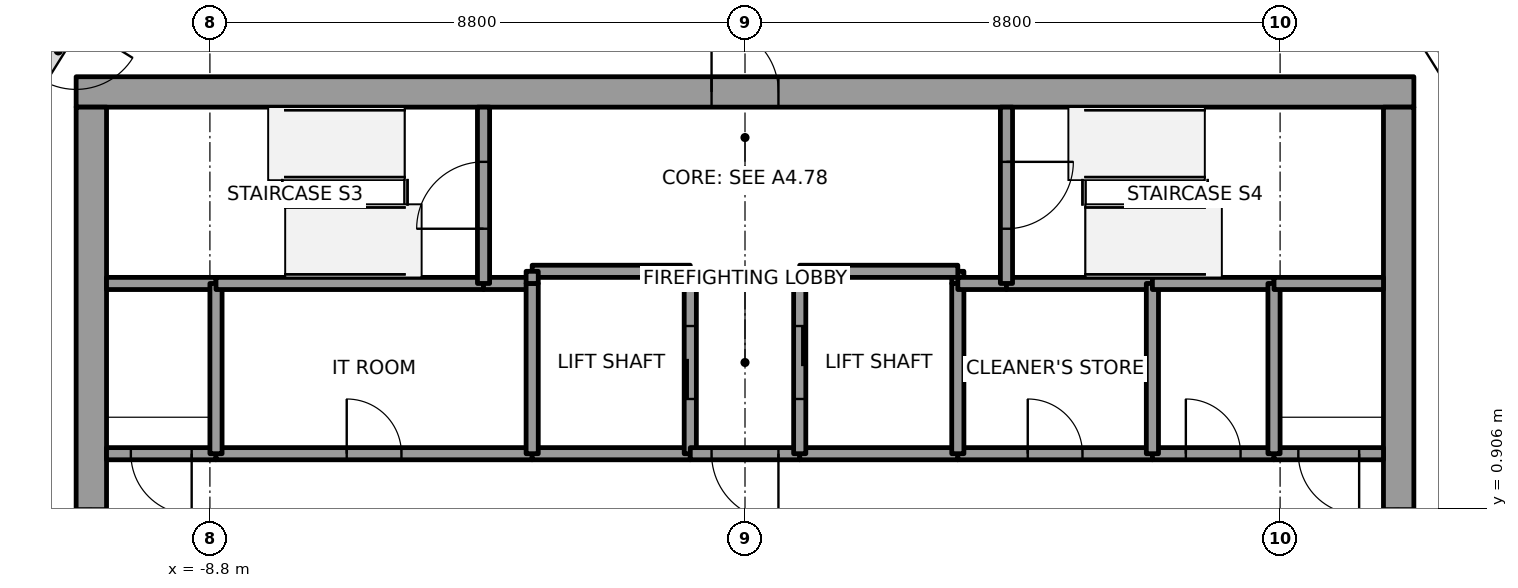
"""IFC4 building model, lengths in metres.
Left out: names, types, materials, properties, quantities, classifications, styles, units other than length and angle.
Written with IfcOpenShell. Run it as: python <this file> out.ifc"""

import sys

from ifc_helpers import new_model, si_unit, direction, frame, frame_2d, origin, place, context, subcontext, project, spatial, rectangle, extrude, element, fill, save


model = new_model("IFC4")
c1 = context("Model", 3, precision=1e-05, world=origin(), true_north=direction((0.0, 1.0)))
c2 = subcontext(c1, "Body", "Model", "MODEL_VIEW")
j1 = project(units=[si_unit("LENGTHUNIT", "METRE"), si_unit("PLANEANGLEUNIT", "RADIAN")], contexts=[c1])
p1 = place(None, origin())
s1 = spatial("IfcSite", under=j1, at=p1, CompositionType="ELEMENT")
p2 = place(p1, origin())
s2 = spatial("IfcBuilding", under=s1, at=p2, CompositionType="ELEMENT")
p3 = place(p2, frame((0.0, 0.0, 339.4)))
s3 = spatial("IfcBuildingStorey", under=s2, at=p3, CompositionType="ELEMENT", Elevation=339.4)
p4 = place(p3, frame((-11.0, 7.75, 0.0), z_axis=(0.0, 0.0, 1.0), x_axis=(1.0, 0.0, 0.0)))
e1 = element("IfcWall", 1, at=p4, inside=s3, PredefinedType="SHEAR", context=c2, shape_type="SweptSolid", body=[
    extrude(rectangle(XDim=22.0, YDim=0.5, at=frame_2d((11.0, 0.0))), origin(), (0.0, 0.0, 1.0), 5.4),
])
p5 = place(p4, frame((10.45, 0.0, 0.0)))
e2 = element("IfcOpeningElement", 2, at=p5, cuts=e1, PredefinedType="OPENING", context=c2, shape_type="SweptSolid", body=[
    extrude(rectangle(XDim=1.1, YDim=2.1, at=frame_2d((0.55, 1.05))), frame((0.0, 0.25, 0.0), z_axis=(0.0, -1.0, 0.0), x_axis=(1.0, 0.0, 0.0)), (0.0, 0.0, 1.0), 0.5),
])
p6 = place(p3, frame((-10.75, -7.5, 0.0), z_axis=(0.0, 0.0, 1.0), x_axis=(0.0, 1.0, 0.0)))
e3 = element("IfcWall", 3, at=p6, inside=s3, PredefinedType="SHEAR", context=c2, shape_type="SweptSolid", body=[
    extrude(rectangle(XDim=15.0, YDim=0.5, at=frame_2d((7.5, 0.0))), origin(), (0.0, 0.0, 1.0), 5.4),
])
p7 = place(p6, frame((6.6, 0.0, 0.0)))
e4 = element("IfcOpeningElement", 4, at=p7, cuts=e3, PredefinedType="OPENING", context=c2, shape_type="SweptSolid", body=[
    extrude(rectangle(XDim=1.8, YDim=2.1, at=frame_2d((0.9, 1.05))), frame((0.0, 0.25, 0.0), z_axis=(0.0, -1.0, 0.0), x_axis=(1.0, 0.0, 0.0)), (0.0, 0.0, 1.0), 0.5),
])
p8 = place(p3, frame((10.75, -7.5, 0.0), z_axis=(0.0, 0.0, 1.0), x_axis=(0.0, 1.0, 0.0)))
e5 = element("IfcWall", 5, at=p8, inside=s3, PredefinedType="SHEAR", context=c2, shape_type="SweptSolid", body=[
    extrude(rectangle(XDim=15.0, YDim=0.5, at=frame_2d((7.5, 0.0))), origin(), (0.0, 0.0, 1.0), 5.4),
])
p9 = place(p8, frame((6.6, 0.0, 0.0)))
e6 = element("IfcOpeningElement", 6, at=p9, cuts=e5, PredefinedType="OPENING", context=c2, shape_type="SweptSolid", body=[
    extrude(rectangle(XDim=1.8, YDim=2.1, at=frame_2d((0.9, 1.05))), frame((0.0, 0.25, 0.0), z_axis=(0.0, -1.0, 0.0), x_axis=(1.0, 0.0, 0.0)), (0.0, 0.0, 1.0), 0.5),
])
p10 = place(p3, frame((-10.372, 9.901, 0.0), z_axis=(0.0, 0.0, 1.0), x_axis=(-0.52965846741, -0.84821100435, 0.0)))
e7 = element("IfcWall", 7, at=p10, inside=s3, PredefinedType="SOLIDWALL", context=c2, shape_type="SweptSolid", body=[
    extrude(rectangle(XDim=3.481, YDim=0.2, at=frame_2d((1.74, 0.0))), origin(), (0.0, 0.0, 1.0), 4.533),
])
p11 = place(p10, frame((1.19, 0.0, 0.0)))
e8 = element("IfcOpeningElement", 8, at=p11, cuts=e7, PredefinedType="OPENING", context=c2, shape_type="SweptSolid", body=[
    extrude(rectangle(XDim=1.1, YDim=2.1, at=frame_2d((0.55, 1.05))), frame((0.0, 0.1, 0.0), z_axis=(0.0, -1.0, 0.0), x_axis=(1.0, 0.0, 0.0)), (0.0, 0.0, 1.0), 0.2),
])
p12 = place(p3, frame((-8.7, 1.8, 0.0), z_axis=(0.0, 0.0, 1.0), x_axis=(-1.0, 0.0, 0.0)))
e9 = element("IfcWall", 9, at=p12, inside=s3, PredefinedType="SOLIDWALL", context=c2, shape_type="SweptSolid", body=[
    extrude(rectangle(XDim=1.8, YDim=0.2, at=frame_2d((0.9, 0.0))), origin(), (0.0, 0.0, 1.0), 5.25),
])
p13 = place(p12, frame((0.4, 0.0, 0.0)))
e10 = element("IfcOpeningElement", 10, at=p13, cuts=e9, PredefinedType="OPENING", context=c2, shape_type="SweptSolid", body=[
    extrude(rectangle(XDim=1.0, YDim=2.1, at=frame_2d((0.5, 1.05))), frame((0.0, 0.1, 0.0), z_axis=(0.0, -1.0, 0.0), x_axis=(1.0, 0.0, 0.0)), (0.0, 0.0, 1.0), 0.2),
])
p14 = place(p3, frame((-8.7, 4.6, 0.0), z_axis=(0.0, 0.0, 1.0), x_axis=(-1.0, 0.0, 0.0)))
e11 = element("IfcWall", 11, at=p14, inside=s3, PredefinedType="SOLIDWALL", context=c2, shape_type="SweptSolid", body=[
    extrude(rectangle(XDim=1.8, YDim=0.2, at=frame_2d((0.9, 0.0))), origin(), (0.0, 0.0, 1.0), 5.25),
])
p15 = place(p3, frame((-8.7, 1.8, 0.0), z_axis=(0.0, 0.0, 1.0), x_axis=(1.0, 0.0, 0.0)))
e12 = element("IfcWall", 12, at=p15, inside=s3, PredefinedType="SOLIDWALL", context=c2, shape_type="SweptSolid", body=[
    extrude(rectangle(XDim=5.2, YDim=0.2, at=frame_2d((2.6, 0.0))), origin(), (0.0, 0.0, 1.0), 5.25),
])
p16 = place(p15, frame((2.15, 0.0, 0.0)))
e13 = element("IfcOpeningElement", 13, at=p16, cuts=e12, PredefinedType="OPENING", context=c2, shape_type="SweptSolid", body=[
    extrude(rectangle(XDim=0.9, YDim=2.1, at=frame_2d((0.45, 1.05))), frame((0.0, 0.1, 0.0), z_axis=(0.0, -1.0, 0.0), x_axis=(1.0, 0.0, 0.0)), (0.0, 0.0, 1.0), 0.2),
])
p17 = place(p3, frame((-8.7, 4.6, 0.0), z_axis=(0.0, 0.0, 1.0), x_axis=(0.0, -1.0, 0.0)))
e14 = element("IfcWall", 14, at=p17, inside=s3, PredefinedType="SOLIDWALL", context=c2, shape_type="SweptSolid", body=[
    extrude(rectangle(XDim=2.8, YDim=0.2, at=frame_2d((1.4, 0.0))), origin(), (0.0, 0.0, 1.0), 5.25),
])
p18 = place(p3, frame((-4.3, 4.6, 0.0), z_axis=(0.0, 0.0, 1.0), x_axis=(-1.0, 0.0, 0.0)))
e15 = element("IfcWall", 15, at=p18, inside=s3, PredefinedType="SOLIDWALL", context=c2, shape_type="SweptSolid", body=[
    extrude(rectangle(XDim=4.4, YDim=0.2, at=frame_2d((2.2, 0.0))), origin(), (0.0, 0.0, 1.0), 5.25),
])
p19 = place(p3, frame((-3.5, 4.6, 0.0), z_axis=(0.0, 0.0, 1.0), x_axis=(-1.0, 0.0, 0.0)))
e16 = element("IfcWall", 16, at=p19, inside=s3, PredefinedType="SOLIDWALL", context=c2, shape_type="SweptSolid", body=[
    extrude(rectangle(XDim=0.8, YDim=0.2, at=frame_2d((0.4, 0.0))), origin(), (0.0, 0.0, 1.0), 5.25),
])
p20 = place(p3, frame((-4.3, 4.6, 0.0), z_axis=(0.0, 0.0, 1.0), x_axis=(0.0, 1.0, 0.0)))
e17 = element("IfcWall", 17, at=p20, inside=s3, PredefinedType="SOLIDWALL", context=c2, shape_type="SweptSolid", body=[
    extrude(rectangle(XDim=2.9, YDim=0.2, at=frame_2d((1.45, 0.0))), origin(), (0.0, 0.0, 1.0), 5.25),
])
p21 = place(p20, frame((0.9, 0.0, 0.0)))
e18 = element("IfcOpeningElement", 18, at=p21, cuts=e17, PredefinedType="OPENING", context=c2, shape_type="SweptSolid", body=[
    extrude(rectangle(XDim=1.1, YDim=2.1, at=frame_2d((0.55, 1.05))), frame((0.0, 0.1, 0.0), z_axis=(0.0, -1.0, 0.0), x_axis=(1.0, 0.0, 0.0)), (0.0, 0.0, 1.0), 0.2),
])
p22 = place(p3, frame((-0.9, 1.8, 0.0), z_axis=(0.0, 0.0, 1.0), x_axis=(-1.0, 0.0, 0.0)))
e19 = element("IfcWall", 19, at=p22, inside=s3, PredefinedType="SOLIDWALL", context=c2, shape_type="SweptSolid", body=[
    extrude(rectangle(XDim=2.6, YDim=0.2, at=frame_2d((1.3, 0.0))), origin(), (0.0, 0.0, 1.0), 5.25),
])
p23 = place(p3, frame((-3.5, 1.8, 0.0), z_axis=(0.0, 0.0, 1.0), x_axis=(0.0, 1.0, 0.0)))
e20 = element("IfcWall", 20, at=p23, inside=s3, PredefinedType="SOLIDWALL", context=c2, shape_type="SweptSolid", body=[
    extrude(rectangle(XDim=2.8, YDim=0.2, at=frame_2d((1.4, 0.0))), origin(), (0.0, 0.0, 1.0), 5.25),
])
p24 = place(p3, frame((-0.9, 1.8, 0.0), z_axis=(0.0, 0.0, 1.0), x_axis=(0.0, 1.0, 0.0)))
e21 = element("IfcWall", 21, at=p24, inside=s3, PredefinedType="SOLIDWALL", context=c2, shape_type="SweptSolid", body=[
    extrude(rectangle(XDim=3.0, YDim=0.2, at=frame_2d((1.5, 0.0))), origin(), (0.0, 0.0, 1.0), 5.25),
])
p25 = place(p24, frame((0.9, 0.0, 0.0)))
e22 = element("IfcOpeningElement", 22, at=p25, cuts=e21, PredefinedType="OPENING", context=c2, shape_type="SweptSolid", body=[
    extrude(rectangle(XDim=1.2, YDim=2.1, at=frame_2d((0.6, 1.05))), frame((0.0, 0.1, 0.0), z_axis=(0.0, -1.0, 0.0), x_axis=(1.0, 0.0, 0.0)), (0.0, 0.0, 1.0), 0.2),
])
p26 = place(p3, frame((-0.9, 4.8, 0.0), z_axis=(0.0, 0.0, 1.0), x_axis=(-1.0, 0.0, 0.0)))
e23 = element("IfcWall", 23, at=p26, inside=s3, PredefinedType="SOLIDWALL", context=c2, shape_type="SweptSolid", body=[
    extrude(rectangle(XDim=2.6, YDim=0.2, at=frame_2d((1.3, 0.0))), origin(), (0.0, 0.0, 1.0), 5.25),
])
p27 = place(p3, frame((-3.5, 4.8, 0.0), z_axis=(0.0, 0.0, 1.0), x_axis=(0.0, -1.0, 0.0)))
e24 = element("IfcWall", 24, at=p27, inside=s3, PredefinedType="SOLIDWALL", context=c2, shape_type="SweptSolid", body=[
    extrude(rectangle(XDim=0.2, YDim=0.2, at=frame_2d((0.1, 0.0))), origin(), (0.0, 0.0, 1.0), 5.25),
])
p28 = place(p3, frame((0.9, 1.8, 0.0), z_axis=(0.0, 0.0, 1.0), x_axis=(-1.0, 0.0, 0.0)))
e25 = element("IfcWall", 25, at=p28, inside=s3, PredefinedType="SOLIDWALL", context=c2, shape_type="SweptSolid", body=[
    extrude(rectangle(XDim=1.8, YDim=0.2, at=frame_2d((0.9, 0.0))), origin(), (0.0, 0.0, 1.0), 5.25),
])
p29 = place(p28, frame((0.35, 0.0, 0.0)))
e26 = element("IfcOpeningElement", 26, at=p29, cuts=e25, PredefinedType="OPENING", context=c2, shape_type="SweptSolid", body=[
    extrude(rectangle(XDim=1.1, YDim=2.1, at=frame_2d((0.55, 1.05))), frame((0.0, 0.1, 0.0), z_axis=(0.0, -1.0, 0.0), x_axis=(1.0, 0.0, 0.0)), (0.0, 0.0, 1.0), 0.2),
])
p30 = place(p3, frame((3.5, 1.8, 0.0), z_axis=(0.0, 0.0, 1.0), x_axis=(-1.0, 0.0, 0.0)))
e27 = element("IfcWall", 27, at=p30, inside=s3, PredefinedType="SOLIDWALL", context=c2, shape_type="SweptSolid", body=[
    extrude(rectangle(XDim=2.6, YDim=0.2, at=frame_2d((1.3, 0.0))), origin(), (0.0, 0.0, 1.0), 5.25),
])
p31 = place(p3, frame((3.5, 4.6, 0.0), z_axis=(0.0, 0.0, 1.0), x_axis=(0.0, 1.0, 0.0)))
e28 = element("IfcWall", 28, at=p31, inside=s3, PredefinedType="SOLIDWALL", context=c2, shape_type="SweptSolid", body=[
    extrude(rectangle(XDim=0.2, YDim=0.2, at=frame_2d((0.1, 0.0))), origin(), (0.0, 0.0, 1.0), 5.25),
])
p32 = place(p3, frame((3.5, 4.8, 0.0), z_axis=(0.0, 0.0, 1.0), x_axis=(-1.0, 0.0, 0.0)))
e29 = element("IfcWall", 29, at=p32, inside=s3, PredefinedType="SOLIDWALL", context=c2, shape_type="SweptSolid", body=[
    extrude(rectangle(XDim=2.6, YDim=0.2, at=frame_2d((1.3, 0.0))), origin(), (0.0, 0.0, 1.0), 5.25),
])
p33 = place(p3, frame((0.9, 4.8, 0.0), z_axis=(0.0, 0.0, 1.0), x_axis=(0.0, -1.0, 0.0)))
e30 = element("IfcWall", 30, at=p33, inside=s3, PredefinedType="SOLIDWALL", context=c2, shape_type="SweptSolid", body=[
    extrude(rectangle(XDim=3.0, YDim=0.2, at=frame_2d((1.5, 0.0))), origin(), (0.0, 0.0, 1.0), 5.25),
])
p34 = place(p33, frame((0.9, 0.0, 0.0)))
e31 = element("IfcOpeningElement", 31, at=p34, cuts=e30, PredefinedType="OPENING", context=c2, shape_type="SweptSolid", body=[
    extrude(rectangle(XDim=1.2, YDim=2.1, at=frame_2d((0.6, 1.05))), frame((0.0, 0.1, 0.0), z_axis=(0.0, -1.0, 0.0), x_axis=(1.0, 0.0, 0.0)), (0.0, 0.0, 1.0), 0.2),
])
p35 = place(p3, frame((3.5, 1.8, 0.0), z_axis=(0.0, 0.0, 1.0), x_axis=(1.0, 0.0, 0.0)))
e32 = element("IfcWall", 32, at=p35, inside=s3, PredefinedType="SOLIDWALL", context=c2, shape_type="SweptSolid", body=[
    extrude(rectangle(XDim=3.2, YDim=0.2, at=frame_2d((1.6, 0.0))), origin(), (0.0, 0.0, 1.0), 5.25),
])
p36 = place(p35, frame((1.15, 0.0, 0.0)))
e33 = element("IfcOpeningElement", 33, at=p36, cuts=e32, PredefinedType="OPENING", context=c2, shape_type="SweptSolid", body=[
    extrude(rectangle(XDim=0.9, YDim=2.1, at=frame_2d((0.45, 1.05))), frame((0.0, 0.1, 0.0), z_axis=(0.0, -1.0, 0.0), x_axis=(1.0, 0.0, 0.0)), (0.0, 0.0, 1.0), 0.2),
])
p37 = place(p3, frame((3.5, 4.6, 0.0), z_axis=(0.0, 0.0, 1.0), x_axis=(0.0, -1.0, 0.0)))
e34 = element("IfcWall", 34, at=p37, inside=s3, PredefinedType="SOLIDWALL", context=c2, shape_type="SweptSolid", body=[
    extrude(rectangle(XDim=2.8, YDim=0.2, at=frame_2d((1.4, 0.0))), origin(), (0.0, 0.0, 1.0), 5.25),
])
p38 = place(p3, frame((4.3, 4.6, 0.0), z_axis=(0.0, 0.0, 1.0), x_axis=(-1.0, 0.0, 0.0)))
e35 = element("IfcWall", 35, at=p38, inside=s3, PredefinedType="SOLIDWALL", context=c2, shape_type="SweptSolid", body=[
    extrude(rectangle(XDim=0.8, YDim=0.2, at=frame_2d((0.4, 0.0))), origin(), (0.0, 0.0, 1.0), 5.25),
])
p39 = place(p3, frame((6.7, 4.6, 0.0), z_axis=(0.0, 0.0, 1.0), x_axis=(-1.0, 0.0, 0.0)))
e36 = element("IfcWall", 36, at=p39, inside=s3, PredefinedType="SOLIDWALL", context=c2, shape_type="SweptSolid", body=[
    extrude(rectangle(XDim=2.4, YDim=0.2, at=frame_2d((1.2, 0.0))), origin(), (0.0, 0.0, 1.0), 5.25),
])
p40 = place(p3, frame((4.3, 7.5, 0.0), z_axis=(0.0, 0.0, 1.0), x_axis=(0.0, -1.0, 0.0)))
e37 = element("IfcWall", 37, at=p40, inside=s3, PredefinedType="SOLIDWALL", context=c2, shape_type="SweptSolid", body=[
    extrude(rectangle(XDim=2.9, YDim=0.2, at=frame_2d((1.45, 0.0))), origin(), (0.0, 0.0, 1.0), 5.25),
])
p41 = place(p40, frame((0.9, 0.0, 0.0)))
e38 = element("IfcOpeningElement", 38, at=p41, cuts=e37, PredefinedType="OPENING", context=c2, shape_type="SweptSolid", body=[
    extrude(rectangle(XDim=1.1, YDim=2.1, at=frame_2d((0.55, 1.05))), frame((0.0, 0.1, 0.0), z_axis=(0.0, -1.0, 0.0), x_axis=(1.0, 0.0, 0.0)), (0.0, 0.0, 1.0), 0.2),
])
p42 = place(p3, frame((6.7, 1.8, 0.0), z_axis=(0.0, 0.0, 1.0), x_axis=(1.0, 0.0, 0.0)))
e39 = element("IfcWall", 39, at=p42, inside=s3, PredefinedType="SOLIDWALL", context=c2, shape_type="SweptSolid", body=[
    extrude(rectangle(XDim=2.0, YDim=0.2, at=frame_2d((1.0, 0.0))), origin(), (0.0, 0.0, 1.0), 5.25),
])
p43 = place(p42, frame((0.55, 0.0, 0.0)))
e40 = element("IfcOpeningElement", 40, at=p43, cuts=e39, PredefinedType="OPENING", context=c2, shape_type="SweptSolid", body=[
    extrude(rectangle(XDim=0.9, YDim=2.1, at=frame_2d((0.45, 1.05))), frame((0.0, 0.1, 0.0), z_axis=(0.0, -1.0, 0.0), x_axis=(1.0, 0.0, 0.0)), (0.0, 0.0, 1.0), 0.2),
])
p44 = place(p3, frame((6.7, 1.8, 0.0), z_axis=(0.0, 0.0, 1.0), x_axis=(0.0, 1.0, 0.0)))
e41 = element("IfcWall", 41, at=p44, inside=s3, PredefinedType="SOLIDWALL", context=c2, shape_type="SweptSolid", body=[
    extrude(rectangle(XDim=2.8, YDim=0.2, at=frame_2d((1.4, 0.0))), origin(), (0.0, 0.0, 1.0), 5.25),
])
p45 = place(p3, frame((8.7, 4.6, 0.0), z_axis=(0.0, 0.0, 1.0), x_axis=(-1.0, 0.0, 0.0)))
e42 = element("IfcWall", 42, at=p45, inside=s3, PredefinedType="SOLIDWALL", context=c2, shape_type="SweptSolid", body=[
    extrude(rectangle(XDim=2.0, YDim=0.2, at=frame_2d((1.0, 0.0))), origin(), (0.0, 0.0, 1.0), 5.25),
])
p46 = place(p3, frame((10.5, 1.8, 0.0), z_axis=(0.0, 0.0, 1.0), x_axis=(-1.0, 0.0, 0.0)))
e43 = element("IfcWall", 43, at=p46, inside=s3, PredefinedType="SOLIDWALL", context=c2, shape_type="SweptSolid", body=[
    extrude(rectangle(XDim=1.8, YDim=0.2, at=frame_2d((0.9, 0.0))), origin(), (0.0, 0.0, 1.0), 5.25),
])
p47 = place(p46, frame((0.4, 0.0, 0.0)))
e44 = element("IfcOpeningElement", 44, at=p47, cuts=e43, PredefinedType="OPENING", context=c2, shape_type="SweptSolid", body=[
    extrude(rectangle(XDim=1.0, YDim=2.1, at=frame_2d((0.5, 1.05))), frame((0.0, 0.1, 0.0), z_axis=(0.0, -1.0, 0.0), x_axis=(1.0, 0.0, 0.0)), (0.0, 0.0, 1.0), 0.2),
])
p48 = place(p3, frame((8.7, 1.8, 0.0), z_axis=(0.0, 0.0, 1.0), x_axis=(0.0, 1.0, 0.0)))
e45 = element("IfcWall", 45, at=p48, inside=s3, PredefinedType="SOLIDWALL", context=c2, shape_type="SweptSolid", body=[
    extrude(rectangle(XDim=2.8, YDim=0.2, at=frame_2d((1.4, 0.0))), origin(), (0.0, 0.0, 1.0), 5.25),
])
p49 = place(p3, frame((10.5, 4.6, 0.0), z_axis=(0.0, 0.0, 1.0), x_axis=(-1.0, 0.0, 0.0)))
e46 = element("IfcWall", 46, at=p49, inside=s3, PredefinedType="SOLIDWALL", context=c2, shape_type="SweptSolid", body=[
    extrude(rectangle(XDim=1.8, YDim=0.2, at=frame_2d((0.9, 0.0))), origin(), (0.0, 0.0, 1.0), 5.25),
])
p50 = place(p11, origin())
e47 = element("IfcDoor", 47, at=p50, inside=s3, OperationType="SINGLE_SWING_LEFT", PredefinedType="DOOR", context=c2, shape_type="SweptSolid", body=[
    extrude(rectangle(XDim=1.1, YDim=2.1, at=frame_2d((0.55, 1.05))), frame((0.0, 0.025, 0.0), z_axis=(0.0, -1.0, 0.0), x_axis=(1.0, 0.0, 0.0)), (0.0, 0.0, 1.0), 0.05),
])
fill(e8, e47)
p51 = place(p25, origin())
e48 = element("IfcDoor", 48, at=p51, inside=s3, OperationType="SLIDING_TO_RIGHT", PredefinedType="DOOR", context=c2, shape_type="SweptSolid", body=[
    extrude(rectangle(XDim=1.2, YDim=2.1, at=frame_2d((0.6, 1.05))), frame((0.0, 0.025, 0.0), z_axis=(0.0, -1.0, 0.0), x_axis=(1.0, 0.0, 0.0)), (0.0, 0.0, 1.0), 0.05),
])
fill(e22, e48)
p52 = place(p34, origin())
e49 = element("IfcDoor", 49, at=p52, inside=s3, OperationType="SLIDING_TO_LEFT", PredefinedType="DOOR", context=c2, shape_type="SweptSolid", body=[
    extrude(rectangle(XDim=1.2, YDim=2.1, at=frame_2d((0.6, 1.05))), frame((0.0, 0.025, 0.0), z_axis=(0.0, -1.0, 0.0), x_axis=(1.0, 0.0, 0.0)), (0.0, 0.0, 1.0), 0.05),
])
fill(e31, e49)
p53 = place(p29, origin())
e50 = element("IfcDoor", 50, at=p53, inside=s3, OperationType="SINGLE_SWING_RIGHT", PredefinedType="DOOR", context=c2, shape_type="SweptSolid", body=[
    extrude(rectangle(XDim=1.1, YDim=2.1, at=frame_2d((0.55, 1.05))), frame((0.0, 0.025, 0.0), z_axis=(0.0, -1.0, 0.0), x_axis=(1.0, 0.0, 0.0)), (0.0, 0.0, 1.0), 0.05),
])
fill(e26, e50)
p54 = place(p13, origin())
e51 = element("IfcDoor", 51, at=p54, inside=s3, OperationType="SINGLE_SWING_RIGHT", PredefinedType="DOOR", context=c2, shape_type="SweptSolid", body=[
    extrude(rectangle(XDim=1.0, YDim=2.1, at=frame_2d((0.5, 1.05))), frame((0.0, 0.025, 0.0), z_axis=(0.0, -1.0, 0.0), x_axis=(1.0, 0.0, 0.0)), (0.0, 0.0, 1.0), 0.05),
])
fill(e10, e51)
p55 = place(p47, origin())
e52 = element("IfcDoor", 52, at=p55, inside=s3, OperationType="SINGLE_SWING_RIGHT", PredefinedType="DOOR", context=c2, shape_type="SweptSolid", body=[
    extrude(rectangle(XDim=1.0, YDim=2.1, at=frame_2d((0.5, 1.05))), frame((0.0, 0.025, 0.0), z_axis=(0.0, -1.0, 0.0), x_axis=(1.0, 0.0, 0.0)), (0.0, 0.0, 1.0), 0.05),
])
fill(e44, e52)
p56 = place(p21, origin())
e53 = element("IfcDoor", 53, at=p56, inside=s3, OperationType="SINGLE_SWING_RIGHT", PredefinedType="DOOR", context=c2, shape_type="SweptSolid", body=[
    extrude(rectangle(XDim=1.1, YDim=2.1, at=frame_2d((0.55, 1.05))), frame((0.0, 0.025, 0.0), z_axis=(0.0, -1.0, 0.0), x_axis=(1.0, 0.0, 0.0)), (0.0, 0.0, 1.0), 0.05),
])
fill(e18, e53)
p57 = place(p41, origin())
e54 = element("IfcDoor", 54, at=p57, inside=s3, OperationType="SINGLE_SWING_RIGHT", PredefinedType="DOOR", context=c2, shape_type="SweptSolid", body=[
    extrude(rectangle(XDim=1.1, YDim=2.1, at=frame_2d((0.55, 1.05))), frame((0.0, 0.025, 0.0), z_axis=(0.0, -1.0, 0.0), x_axis=(1.0, 0.0, 0.0)), (0.0, 0.0, 1.0), 0.05),
])
fill(e38, e54)
p58 = place(p36, origin())
e55 = element("IfcDoor", 55, at=p58, inside=s3, OperationType="SINGLE_SWING_RIGHT", PredefinedType="DOOR", context=c2, shape_type="SweptSolid", body=[
    extrude(rectangle(XDim=0.9, YDim=2.1, at=frame_2d((0.45, 1.05))), frame((0.0, 0.025, 0.0), z_axis=(0.0, -1.0, 0.0), x_axis=(1.0, 0.0, 0.0)), (0.0, 0.0, 1.0), 0.05),
])
fill(e33, e55)
p59 = place(p43, origin())
e56 = element("IfcDoor", 56, at=p59, inside=s3, OperationType="SINGLE_SWING_RIGHT", PredefinedType="DOOR", context=c2, shape_type="SweptSolid", body=[
    extrude(rectangle(XDim=0.9, YDim=2.1, at=frame_2d((0.45, 1.05))), frame((0.0, 0.025, 0.0), z_axis=(0.0, -1.0, 0.0), x_axis=(1.0, 0.0, 0.0)), (0.0, 0.0, 1.0), 0.05),
])
fill(e40, e56)
p60 = place(p16, origin())
e57 = element("IfcDoor", 57, at=p60, inside=s3, OperationType="SINGLE_SWING_LEFT", PredefinedType="DOOR", context=c2, shape_type="SweptSolid", body=[
    extrude(rectangle(XDim=0.9, YDim=2.1, at=frame_2d((0.45, 1.05))), frame((0.0, 0.025, 0.0), z_axis=(0.0, -1.0, 0.0), x_axis=(1.0, 0.0, 0.0)), (0.0, 0.0, 1.0), 0.05),
])
fill(e13, e57)
p61 = place(p7, origin())
e58 = element("IfcDoor", 58, at=p61, inside=s3, OperationType="DOUBLE_DOOR_SINGLE_SWING", PredefinedType="DOOR", context=c2, shape_type="SweptSolid", body=[
    extrude(rectangle(XDim=1.8, YDim=2.1, at=frame_2d((0.9, 1.05))), frame((0.0, 0.025, 0.0), z_axis=(0.0, -1.0, 0.0), x_axis=(1.0, 0.0, 0.0)), (0.0, 0.0, 1.0), 0.05),
])
fill(e4, e58)
p62 = place(p9, origin())
e59 = element("IfcDoor", 59, at=p62, inside=s3, OperationType="DOUBLE_DOOR_SINGLE_SWING", PredefinedType="DOOR", context=c2, shape_type="SweptSolid", body=[
    extrude(rectangle(XDim=1.8, YDim=2.1, at=frame_2d((0.9, 1.05))), frame((0.0, 0.025, 0.0), z_axis=(0.0, -1.0, 0.0), x_axis=(1.0, 0.0, 0.0)), (0.0, 0.0, 1.0), 0.05),
])
fill(e6, e59)
p63 = place(p5, origin())
e60 = element("IfcDoor", 60, at=p63, inside=s3, OperationType="SINGLE_SWING_RIGHT", PredefinedType="DOOR", context=c2, shape_type="SweptSolid", body=[
    extrude(rectangle(XDim=1.1, YDim=2.1, at=frame_2d((0.55, 1.05))), frame((0.0, 0.025, 0.0), z_axis=(0.0, -1.0, 0.0), x_axis=(1.0, 0.0, 0.0)), (0.0, 0.0, 1.0), 0.05),
])
fill(e2, e60)
save(model, sys.argv[1])
